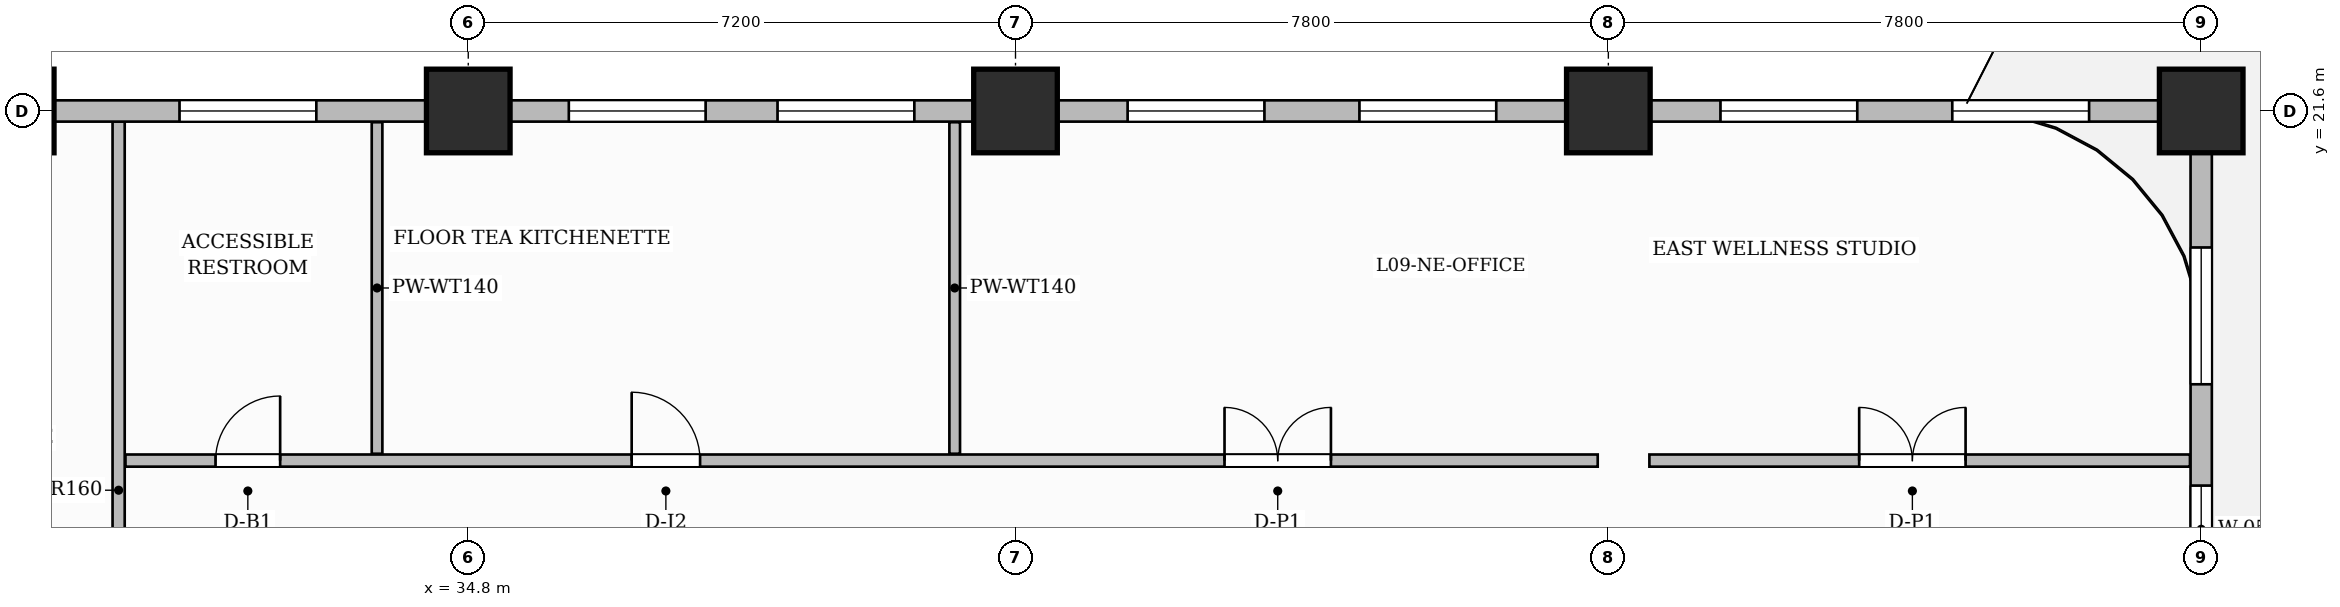
"""IFC4 building model, lengths in metres.
Left out: names, types, materials, properties, quantities, classifications, styles, units other than length and angle.
Written with IfcOpenShell. Run it as: python <this file> out.ifc"""

import sys

from ifc_helpers import new_model, si_unit, direction, frame, frame_2d, origin, origin_2d, place, context, subcontext, project, spatial, rectangle, extrude, source, transform, mapped, element, fill, save


model = new_model("IFC4")
c1 = context("Model", 3, precision=1e-05, world=origin(), true_north=direction((0.0, 1.0)))
c2 = subcontext(c1, "Body", "Model", "MODEL_VIEW")
j1 = project(units=[si_unit("LENGTHUNIT", "METRE"), si_unit("PLANEANGLEUNIT", "RADIAN")], contexts=[c1])
p1 = place(None, origin())
s1 = spatial("IfcSite", under=j1, at=p1, CompositionType="ELEMENT")
p2 = place(p1, origin())
s2 = spatial("IfcBuilding", under=s1, at=p2, CompositionType="ELEMENT")
p3 = place(p2, frame((0.0, 0.0, 43.5)))
s3 = spatial("IfcBuildingStorey", under=s2, at=p3, CompositionType="ELEMENT", Elevation=43.5)
m1 = source(origin(), c2, "Body", "SweptSolid", [
    extrude(rectangle(XDim=1.1, YDim=1.1, at=origin_2d()), origin(), (0.0, 0.0, 1.0), 3.7),
])
for number, where, z_axis, x_axis in (
    (1, (28.8, 21.6, 0.0), (0.0, 0.0, 1.0), (1.0, 0.0, 0.0)),
    (2, (34.8, 21.6, 0.0), (0.0, 0.0, 1.0), (1.0, 0.0, 0.0)),
    (3, (42.0, 21.6, 0.0), (0.0, 0.0, 1.0), (1.0, 0.0, 0.0)),
    (4, (49.8, 21.6, 0.0), (0.0, 0.0, 1.0), (1.0, 0.0, 0.0)),
    (5, (57.6, 21.6, 0.0), (0.0, 0.0, 1.0), (1.0, 0.0, 0.0)),
):
    element("IfcColumn", number, at=place(p3, frame(where, z_axis=z_axis, x_axis=x_axis)), inside=s3, PredefinedType="COLUMN", context=c2, shape_type="MappedRepresentation", body=[
        mapped(m1, transform((0.0, 0.0, 0.0), scale=1.0)),
    ])
p4 = place(p3, frame((30.2, 11.76, 0.0), z_axis=(0.0, 0.0, 1.0), x_axis=(0.0, 1.0, 0.0)))
e6 = element("IfcWall", 6, at=p4, inside=s3, PredefinedType="PARTITIONING", context=c2, shape_type="SweptSolid", body=[
    extrude(rectangle(XDim=9.7, YDim=0.16, at=frame_2d((4.85, 0.0))), origin(), (0.0, 0.0, 1.0), 3.45),
])
p5 = place(p3, frame((30.29, 17.0, 0.0), z_axis=(0.0, 0.0, 1.0), x_axis=(1.0, 0.0, 0.0)))
e7 = element("IfcWall", 7, at=p5, inside=s3, PredefinedType="PARTITIONING", context=c2, shape_type="SweptSolid", body=[
    extrude(rectangle(XDim=19.37, YDim=0.16, at=frame_2d((9.685, 0.0))), origin(), (0.0, 0.0, 1.0), 3.45),
])
p6 = place(p5, frame((1.185, 0.0, 0.0)))
e8 = element("IfcOpeningElement", 8, at=p6, cuts=e7, PredefinedType="OPENING", context=c2, shape_type="SweptSolid", body=[
    extrude(rectangle(XDim=0.85, YDim=2.1, at=frame_2d((0.425, 1.05))), frame((0.0, 0.09, 0.0), z_axis=(0.0, -1.0, 0.0), x_axis=(1.0, 0.0, 0.0)), (0.0, 0.0, 1.0), 0.18),
])
p7 = place(p5, frame((6.66, 0.0, 0.0)))
e9 = element("IfcOpeningElement", 9, at=p7, cuts=e7, PredefinedType="OPENING", context=c2, shape_type="SweptSolid", body=[
    extrude(rectangle(XDim=0.9, YDim=2.15, at=frame_2d((0.45, 1.075))), frame((0.0, 0.09, 0.0), z_axis=(0.0, -1.0, 0.0), x_axis=(1.0, 0.0, 0.0)), (0.0, 0.0, 1.0), 0.18),
])
p8 = place(p5, frame((14.46, 0.0, 0.0)))
e10 = element("IfcOpeningElement", 10, at=p8, cuts=e7, PredefinedType="OPENING", context=c2, shape_type="SweptSolid", body=[
    extrude(rectangle(XDim=1.4, YDim=2.35, at=frame_2d((0.7, 1.175))), frame((0.0, 0.09, 0.0), z_axis=(0.0, -1.0, 0.0), x_axis=(1.0, 0.0, 0.0)), (0.0, 0.0, 1.0), 0.18),
])
p9 = place(p3, frame((50.34, 17.0, 0.0), z_axis=(0.0, 0.0, 1.0), x_axis=(1.0, 0.0, 0.0)))
e11 = element("IfcWall", 11, at=p9, inside=s3, PredefinedType="PARTITIONING", context=c2, shape_type="SweptSolid", body=[
    extrude(rectangle(XDim=7.112, YDim=0.16, at=frame_2d((3.556, 0.0))), origin(), (0.0, 0.0, 1.0), 3.45),
])
p10 = place(p9, frame((2.76, 0.0, 0.0)))
e12 = element("IfcOpeningElement", 12, at=p10, cuts=e11, PredefinedType="OPENING", context=c2, shape_type="SweptSolid", body=[
    extrude(rectangle(XDim=1.4, YDim=2.35, at=frame_2d((0.7, 1.175))), frame((0.0, 0.09, 0.0), z_axis=(0.0, -1.0, 0.0), x_axis=(1.0, 0.0, 0.0)), (0.0, 0.0, 1.0), 0.18),
])
for number, where, z_axis, x_axis in (
    (13, (33.6, 17.09, 0.0), (0.0, 0.0, 1.0), (0.0, 1.0, 0.0)),
    (14, (41.2, 17.09, 0.0), (0.0, 0.0, 1.0), (0.0, 1.0, 0.0)),
):
    element("IfcWall", number, at=place(p3, frame(where, z_axis=z_axis, x_axis=x_axis)), inside=s3, PredefinedType="PARTITIONING", context=c2, shape_type="SweptSolid", body=[
        extrude(rectangle(XDim=4.362, YDim=0.14, at=frame_2d((2.181, 0.0))), origin(), (0.0, 0.0, 1.0), 3.45),
    ])
p11 = place(p3, frame((57.6, 0.05, 0.0), z_axis=(0.0, 0.0, 1.0), x_axis=(0.0, 1.0, 0.0)))
e15 = element("IfcWall", 15, at=p11, inside=s3, PredefinedType="SOLIDWALL", context=c2, shape_type="SweptSolid", body=[
    extrude(rectangle(XDim=21.5, YDim=0.28, at=frame_2d((10.75, 0.0))), origin(), (0.0, 0.0, 1.0), 2.885),
])
p12 = place(p11, frame((2.75, 0.0, 0.0)))
e16 = element("IfcOpeningElement", 16, at=p12, cuts=e15, PredefinedType="OPENING", context=c2, shape_type="SweptSolid", body=[
    extrude(rectangle(XDim=1.2, YDim=2.2, at=frame_2d((0.6, 1.1))), frame((0.0, 0.15, 0.0), z_axis=(0.0, -1.0, 0.0), x_axis=(1.0, 0.0, 0.0)), (0.0, 0.0, 1.0), 0.3),
])
p13 = place(p11, frame((1.025, 0.0, 0.8)))
e17 = element("IfcOpeningElement", 17, at=p13, cuts=e15, PredefinedType="OPENING", context=c2, shape_type="SweptSolid", body=[
    extrude(rectangle(XDim=1.15, YDim=1.8, at=frame_2d((0.575, 0.9))), frame((0.0, 0.15, 0.0), z_axis=(0.0, -1.0, 0.0), x_axis=(1.0, 0.0, 0.0)), (0.0, 0.0, 1.0), 0.3),
])
p14 = place(p11, frame((4.6, 0.0, 0.8)))
e18 = element("IfcOpeningElement", 18, at=p14, cuts=e15, PredefinedType="OPENING", context=c2, shape_type="SweptSolid", body=[
    extrude(rectangle(XDim=1.4, YDim=1.85, at=frame_2d((0.7, 0.925))), frame((0.0, 0.15, 0.0), z_axis=(0.0, -1.0, 0.0), x_axis=(1.0, 0.0, 0.0)), (0.0, 0.0, 1.0), 0.3),
])
p15 = place(p11, frame((8.475, 0.0, 0.8)))
e19 = element("IfcOpeningElement", 19, at=p15, cuts=e15, PredefinedType="OPENING", context=c2, shape_type="SweptSolid", body=[
    extrude(rectangle(XDim=1.8, YDim=1.85, at=frame_2d((0.9, 0.925))), frame((0.0, 0.15, 0.0), z_axis=(0.0, -1.0, 0.0), x_axis=(1.0, 0.0, 0.0)), (0.0, 0.0, 1.0), 0.3),
])
p16 = place(p11, frame((11.225, 0.0, 0.8)))
e20 = element("IfcOpeningElement", 20, at=p16, cuts=e15, PredefinedType="OPENING", context=c2, shape_type="SweptSolid", body=[
    extrude(rectangle(XDim=1.8, YDim=1.85, at=frame_2d((0.9, 0.925))), frame((0.0, 0.15, 0.0), z_axis=(0.0, -1.0, 0.0), x_axis=(1.0, 0.0, 0.0)), (0.0, 0.0, 1.0), 0.3),
])
p17 = place(p11, frame((15.471, 0.0, 0.8)))
e21 = element("IfcOpeningElement", 21, at=p17, cuts=e15, PredefinedType="OPENING", context=c2, shape_type="SweptSolid", body=[
    extrude(rectangle(XDim=1.15, YDim=1.8, at=frame_2d((0.575, 0.9))), frame((0.0, 0.15, 0.0), z_axis=(0.0, -1.0, 0.0), x_axis=(1.0, 0.0, 0.0)), (0.0, 0.0, 1.0), 0.3),
])
p18 = place(p11, frame((17.954, 0.0, 0.8)))
e22 = element("IfcOpeningElement", 22, at=p18, cuts=e15, PredefinedType="OPENING", context=c2, shape_type="SweptSolid", body=[
    extrude(rectangle(XDim=1.8, YDim=1.85, at=frame_2d((0.9, 0.925))), frame((0.0, 0.15, 0.0), z_axis=(0.0, -1.0, 0.0), x_axis=(1.0, 0.0, 0.0)), (0.0, 0.0, 1.0), 0.3),
])
p19 = place(p3, frame((14.4, 21.6, 0.0), z_axis=(0.0, 0.0, 1.0), x_axis=(1.0, 0.0, 0.0)))
e23 = element("IfcWall", 23, at=p19, inside=s3, PredefinedType="SOLIDWALL", context=c2, shape_type="SweptSolid", body=[
    extrude(rectangle(XDim=43.2, YDim=0.28, at=frame_2d((21.6, 0.0))), origin(), (0.0, 0.0, 1.0), 2.885),
])
p20 = place(p19, frame((1.5, 0.0, 0.0)))
e24 = element("IfcOpeningElement", 24, at=p20, cuts=e23, PredefinedType="OPENING", context=c2, shape_type="SweptSolid", body=[
    extrude(rectangle(XDim=1.2, YDim=2.2, at=frame_2d((0.6, 1.1))), frame((0.0, 0.15, 0.0), z_axis=(0.0, -1.0, 0.0), x_axis=(1.0, 0.0, 0.0)), (0.0, 0.0, 1.0), 0.3),
])
p21 = place(p19, frame((3.336, 0.0, 0.8)))
e25 = element("IfcOpeningElement", 25, at=p21, cuts=e23, PredefinedType="OPENING", context=c2, shape_type="SweptSolid", body=[
    extrude(rectangle(XDim=1.4, YDim=1.85, at=frame_2d((0.7, 0.925))), frame((0.0, 0.15, 0.0), z_axis=(0.0, -1.0, 0.0), x_axis=(1.0, 0.0, 0.0)), (0.0, 0.0, 1.0), 0.3),
])
p22 = place(p19, frame((5.269, 0.0, 0.8)))
e26 = element("IfcOpeningElement", 26, at=p22, cuts=e23, PredefinedType="OPENING", context=c2, shape_type="SweptSolid", body=[
    extrude(rectangle(XDim=0.95, YDim=1.75, at=frame_2d((0.475, 0.875))), frame((0.0, 0.15, 0.0), z_axis=(0.0, -1.0, 0.0), x_axis=(1.0, 0.0, 0.0)), (0.0, 0.0, 1.0), 0.3),
])
p23 = place(p19, frame((8.321, 0.0, 0.8)))
e27 = element("IfcOpeningElement", 27, at=p23, cuts=e23, PredefinedType="OPENING", context=c2, shape_type="SweptSolid", body=[
    extrude(rectangle(XDim=1.15, YDim=1.8, at=frame_2d((0.575, 0.9))), frame((0.0, 0.15, 0.0), z_axis=(0.0, -1.0, 0.0), x_axis=(1.0, 0.0, 0.0)), (0.0, 0.0, 1.0), 0.3),
])
p24 = place(p19, frame((10.804, 0.0, 0.8)))
e28 = element("IfcOpeningElement", 28, at=p24, cuts=e23, PredefinedType="OPENING", context=c2, shape_type="SweptSolid", body=[
    extrude(rectangle(XDim=1.8, YDim=1.85, at=frame_2d((0.9, 0.925))), frame((0.0, 0.15, 0.0), z_axis=(0.0, -1.0, 0.0), x_axis=(1.0, 0.0, 0.0)), (0.0, 0.0, 1.0), 0.3),
])
p25 = place(p19, frame((16.601, 0.0, 0.8)))
e29 = element("IfcOpeningElement", 29, at=p25, cuts=e23, PredefinedType="OPENING", context=c2, shape_type="SweptSolid", body=[
    extrude(rectangle(XDim=1.8, YDim=1.85, at=frame_2d((0.9, 0.925))), frame((0.0, 0.15, 0.0), z_axis=(0.0, -1.0, 0.0), x_axis=(1.0, 0.0, 0.0)), (0.0, 0.0, 1.0), 0.3),
])
p26 = place(p19, frame((21.723, 0.0, 0.8)))
e30 = element("IfcOpeningElement", 30, at=p26, cuts=e23, PredefinedType="OPENING", context=c2, shape_type="SweptSolid", body=[
    extrude(rectangle(XDim=1.8, YDim=1.85, at=frame_2d((0.9, 0.925))), frame((0.0, 0.15, 0.0), z_axis=(0.0, -1.0, 0.0), x_axis=(1.0, 0.0, 0.0)), (0.0, 0.0, 1.0), 0.3),
])
p27 = place(p19, frame((24.469, 0.0, 0.8)))
e31 = element("IfcOpeningElement", 31, at=p27, cuts=e23, PredefinedType="OPENING", context=c2, shape_type="SweptSolid", body=[
    extrude(rectangle(XDim=1.8, YDim=1.85, at=frame_2d((0.9, 0.925))), frame((0.0, 0.15, 0.0), z_axis=(0.0, -1.0, 0.0), x_axis=(1.0, 0.0, 0.0)), (0.0, 0.0, 1.0), 0.3),
])
p28 = place(p19, frame((29.075, 0.0, 0.8)))
e32 = element("IfcOpeningElement", 32, at=p28, cuts=e23, PredefinedType="OPENING", context=c2, shape_type="SweptSolid", body=[
    extrude(rectangle(XDim=1.8, YDim=1.85, at=frame_2d((0.9, 0.925))), frame((0.0, 0.15, 0.0), z_axis=(0.0, -1.0, 0.0), x_axis=(1.0, 0.0, 0.0)), (0.0, 0.0, 1.0), 0.3),
])
p29 = place(p19, frame((32.125, 0.0, 0.8)))
e33 = element("IfcOpeningElement", 33, at=p29, cuts=e23, PredefinedType="OPENING", context=c2, shape_type="SweptSolid", body=[
    extrude(rectangle(XDim=1.8, YDim=1.85, at=frame_2d((0.9, 0.925))), frame((0.0, 0.15, 0.0), z_axis=(0.0, -1.0, 0.0), x_axis=(1.0, 0.0, 0.0)), (0.0, 0.0, 1.0), 0.3),
])
p30 = place(p19, frame((36.875, 0.0, 0.8)))
e34 = element("IfcOpeningElement", 34, at=p30, cuts=e23, PredefinedType="OPENING", context=c2, shape_type="SweptSolid", body=[
    extrude(rectangle(XDim=1.8, YDim=1.85, at=frame_2d((0.9, 0.925))), frame((0.0, 0.15, 0.0), z_axis=(0.0, -1.0, 0.0), x_axis=(1.0, 0.0, 0.0)), (0.0, 0.0, 1.0), 0.3),
])
p31 = place(p19, frame((39.925, 0.0, 0.8)))
e35 = element("IfcOpeningElement", 35, at=p31, cuts=e23, PredefinedType="OPENING", context=c2, shape_type="SweptSolid", body=[
    extrude(rectangle(XDim=1.8, YDim=1.85, at=frame_2d((0.9, 0.925))), frame((0.0, 0.15, 0.0), z_axis=(0.0, -1.0, 0.0), x_axis=(1.0, 0.0, 0.0)), (0.0, 0.0, 1.0), 0.3),
])
m2 = source(origin(), c2, "Body", "SweptSolid", [
    extrude(rectangle(XDim=1.4, YDim=2.35, at=frame_2d((0.7, 1.175))), frame((0.0, 0.025, 0.0), z_axis=(0.0, -1.0, 0.0), x_axis=(1.0, 0.0, 0.0)), (0.0, 0.0, 1.0), 0.05),
])
p32 = place(p10, origin())
e36 = element("IfcDoor", 36, at=p32, inside=s3, OperationType="DOUBLE_DOOR_SINGLE_SWING", PredefinedType="DOOR", context=c2, shape_type="MappedRepresentation", body=[
    mapped(m2, transform((0.0, 0.0, 0.0), scale=1.0)),
])
fill(e12, e36)
m3 = source(origin(), c2, "Body", "SweptSolid", [
    extrude(rectangle(XDim=0.85, YDim=2.1, at=frame_2d((0.425, 1.05))), frame((0.0, 0.025, 0.0), z_axis=(0.0, -1.0, 0.0), x_axis=(1.0, 0.0, 0.0)), (0.0, 0.0, 1.0), 0.05),
])
p33 = place(p6, origin())
e37 = element("IfcDoor", 37, at=p33, inside=s3, OperationType="SINGLE_SWING_RIGHT", PredefinedType="DOOR", context=c2, shape_type="MappedRepresentation", body=[
    mapped(m3, transform((0.0, 0.0, 0.0), scale=1.0)),
])
fill(e8, e37)
m4 = source(origin(), c2, "Body", "SweptSolid", [
    extrude(rectangle(XDim=0.9, YDim=2.15, at=frame_2d((0.45, 1.075))), frame((0.0, 0.025, 0.0), z_axis=(0.0, -1.0, 0.0), x_axis=(1.0, 0.0, 0.0)), (0.0, 0.0, 1.0), 0.05),
])
p34 = place(p7, origin())
e38 = element("IfcDoor", 38, at=p34, inside=s3, OperationType="SINGLE_SWING_LEFT", PredefinedType="DOOR", context=c2, shape_type="MappedRepresentation", body=[
    mapped(m4, transform((0.0, 0.0, 0.0), scale=1.0)),
])
fill(e9, e38)
p35 = place(p8, origin())
e39 = element("IfcDoor", 39, at=p35, inside=s3, OperationType="DOUBLE_DOOR_SINGLE_SWING", PredefinedType="DOOR", context=c2, shape_type="MappedRepresentation", body=[
    mapped(m2, transform((0.0, 0.0, 0.0), scale=1.0)),
])
fill(e10, e39)
m5 = source(origin(), c2, "Body", "SweptSolid", [
    extrude(rectangle(XDim=1.15, YDim=1.8, at=frame_2d((0.575, 0.9))), frame((0.0, 0.03, 0.0), z_axis=(0.0, -1.0, 0.0), x_axis=(1.0, 0.0, 0.0)), (0.0, 0.0, 1.0), 0.06),
])
p36 = place(p17, origin())
e40 = element("IfcWindow", 40, at=p36, inside=s3, PartitioningType="SINGLE_PANEL", PredefinedType="WINDOW", context=c2, shape_type="MappedRepresentation", body=[
    mapped(m5, transform((0.0, 0.0, 0.0), scale=1.0)),
])
fill(e21, e40)
m6 = source(origin(), c2, "Body", "SweptSolid", [
    extrude(rectangle(XDim=1.8, YDim=1.85, at=frame_2d((0.9, 0.925))), frame((0.0, 0.03, 0.0), z_axis=(0.0, -1.0, 0.0), x_axis=(1.0, 0.0, 0.0)), (0.0, 0.0, 1.0), 0.06),
])
p37 = place(p18, origin())
e41 = element("IfcWindow", 41, at=p37, inside=s3, PartitioningType="DOUBLE_PANEL_VERTICAL", PredefinedType="WINDOW", context=c2, shape_type="MappedRepresentation", body=[
    mapped(m6, transform((0.0, 0.0, 0.0), scale=1.0)),
])
fill(e22, e41)
p38 = place(p25, origin())
e42 = element("IfcWindow", 42, at=p38, inside=s3, PartitioningType="DOUBLE_PANEL_VERTICAL", PredefinedType="WINDOW", context=c2, shape_type="MappedRepresentation", body=[
    mapped(m6, transform((0.0, 0.0, 0.0), scale=1.0)),
])
fill(e29, e42)
p39 = place(p26, origin())
e43 = element("IfcWindow", 43, at=p39, inside=s3, PartitioningType="DOUBLE_PANEL_VERTICAL", PredefinedType="WINDOW", context=c2, shape_type="MappedRepresentation", body=[
    mapped(m6, transform((0.0, 0.0, 0.0), scale=1.0)),
])
fill(e30, e43)
p40 = place(p27, origin())
e44 = element("IfcWindow", 44, at=p40, inside=s3, PartitioningType="DOUBLE_PANEL_VERTICAL", PredefinedType="WINDOW", context=c2, shape_type="MappedRepresentation", body=[
    mapped(m6, transform((0.0, 0.0, 0.0), scale=1.0)),
])
fill(e31, e44)
p41 = place(p28, origin())
e45 = element("IfcWindow", 45, at=p41, inside=s3, PartitioningType="DOUBLE_PANEL_VERTICAL", PredefinedType="WINDOW", context=c2, shape_type="MappedRepresentation", body=[
    mapped(m6, transform((0.0, 0.0, 0.0), scale=1.0)),
])
fill(e32, e45)
p42 = place(p29, origin())
e46 = element("IfcWindow", 46, at=p42, inside=s3, PartitioningType="DOUBLE_PANEL_VERTICAL", PredefinedType="WINDOW", context=c2, shape_type="MappedRepresentation", body=[
    mapped(m6, transform((0.0, 0.0, 0.0), scale=1.0)),
])
fill(e33, e46)
p43 = place(p30, origin())
e47 = element("IfcWindow", 47, at=p43, inside=s3, PartitioningType="DOUBLE_PANEL_VERTICAL", PredefinedType="WINDOW", context=c2, shape_type="MappedRepresentation", body=[
    mapped(m6, transform((0.0, 0.0, 0.0), scale=1.0)),
])
fill(e34, e47)
p44 = place(p31, origin())
e48 = element("IfcWindow", 48, at=p44, inside=s3, PartitioningType="DOUBLE_PANEL_VERTICAL", PredefinedType="WINDOW", context=c2, shape_type="MappedRepresentation", body=[
    mapped(m6, transform((0.0, 0.0, 0.0), scale=1.0)),
])
fill(e35, e48)
save(model, sys.argv[1])
